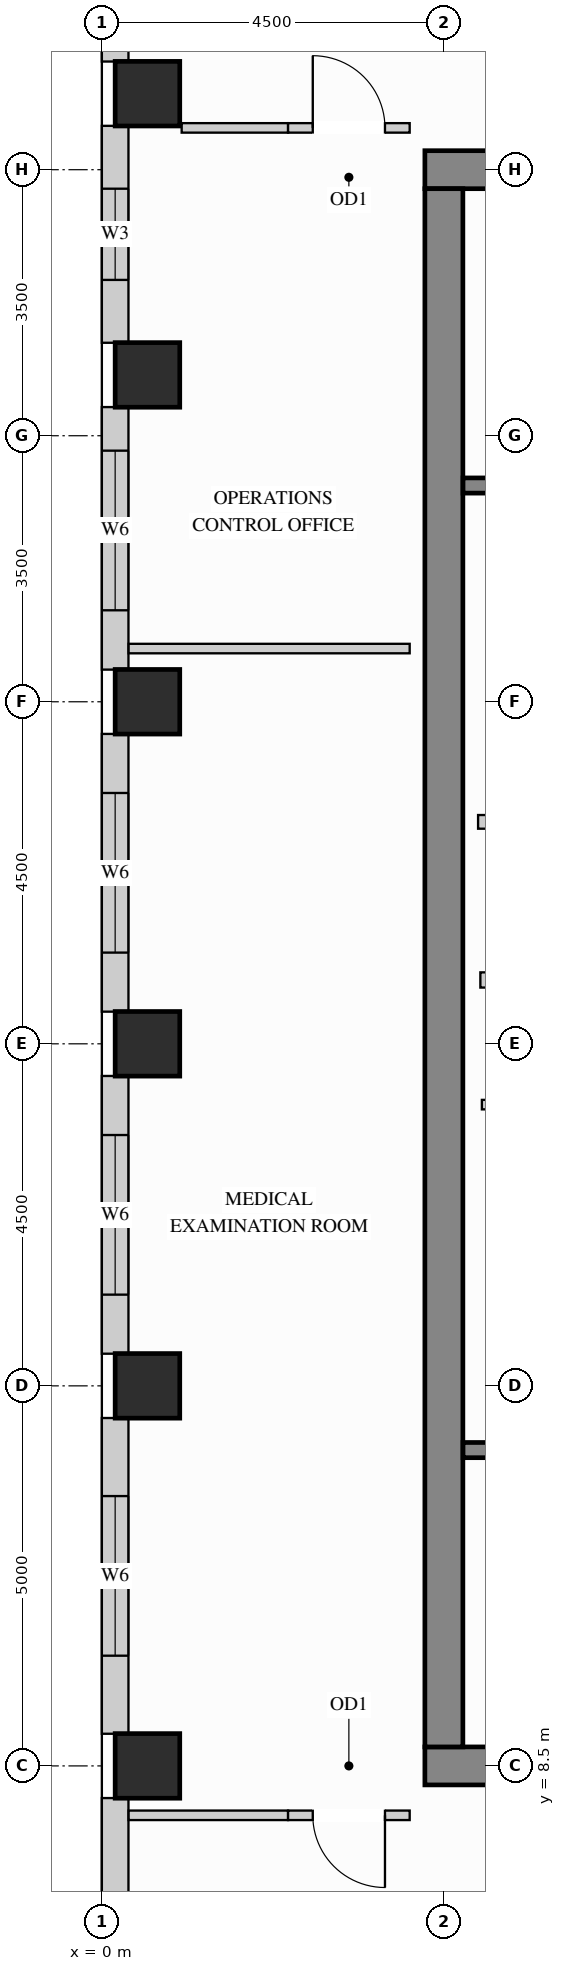
"""IFC4 building model, lengths in metres.
Left out: names, types, materials, properties, quantities, classifications, styles, units other than length and angle.
Written with IfcOpenShell. Run it as: python <this file> out.ifc"""

import sys

from ifc_helpers import new_model, si_unit, direction, frame, frame_2d, origin, origin_2d, place, context, subcontext, project, spatial, rectangle, extrude, source, transform, mapped, element, fill, save


model = new_model("IFC4")
c1 = context("Model", 3, precision=1e-05, world=origin(), true_north=direction((0.0, 1.0)))
c2 = subcontext(c1, "Body", "Model", "MODEL_VIEW")
j1 = project(units=[si_unit("LENGTHUNIT", "METRE"), si_unit("PLANEANGLEUNIT", "RADIAN")], contexts=[c1])
p1 = place(None, origin())
s1 = spatial("IfcSite", under=j1, at=p1, CompositionType="ELEMENT")
p2 = place(p1, origin())
s2 = spatial("IfcBuilding", under=s1, at=p2, CompositionType="ELEMENT")
p3 = place(p2, frame((0.0, 0.0, 248.4)))
s3 = spatial("IfcBuildingStorey", under=s2, at=p3, CompositionType="ELEMENT", Elevation=248.4)
m1 = source(origin(), c2, "Body", "SweptSolid", [
    extrude(rectangle(XDim=0.85, YDim=0.85, at=origin_2d()), origin(), (0.0, 0.0, 1.0), 3.4),
])
for number, where, z_axis, x_axis in (
    (1, (0.6, 13.5, 0.0), (0.0, 0.0, 1.0), (1.0, 0.0, 0.0)),
    (2, (0.6, 18.0, 0.0), (0.0, 0.0, 1.0), (1.0, 0.0, 0.0)),
    (3, (0.6, 22.5, 0.0), (0.0, 0.0, 1.0), (1.0, 0.0, 0.0)),
    (4, (0.6, 26.8, 0.0), (0.0, 0.0, 1.0), (1.0, 0.0, 0.0)),
    (5, (0.6, 30.5, 0.0), (0.0, 0.0, 1.0), (1.0, 0.0, 0.0)),
    (6, (0.6, 8.5, 0.0), (0.0, 0.0, 1.0), (1.0, 0.0, 0.0)),
):
    element("IfcColumn", number, at=place(p3, frame(where, z_axis=z_axis, x_axis=x_axis)), inside=s3, PredefinedType="COLUMN", context=c2, shape_type="MappedRepresentation", body=[
        mapped(m1, transform((0.0, 0.0, 0.0), x_axis=(1.0, 0.0, 0.0), y_axis=(0.0, 1.0, 0.0), z_axis=(0.0, 0.0, 1.0))),
    ])
m2 = source(origin(), c2, "Body", "SweptSolid", [
    extrude(rectangle(XDim=10.5, YDim=0.5, at=frame_2d((5.25, 0.0))), origin(), (0.0, 0.0, 1.0), 3.4),
])
for number, where, z_axis, x_axis in (
    (7, (4.25, 29.5, 0.0), (0.0, 0.0, 1.0), (1.0, 0.0, 0.0)),
    (8, (4.25, 8.5, 0.0), (0.0, 0.0, 1.0), (1.0, 0.0, 0.0)),
):
    element("IfcWall", number, at=place(p3, frame(where, z_axis=z_axis, x_axis=x_axis)), inside=s3, PredefinedType="SHEAR", context=c2, shape_type="MappedRepresentation", body=[
        mapped(m2, transform((0.0, 0.0, 0.0), x_axis=(1.0, 0.0, 0.0), y_axis=(0.0, 1.0, 0.0), z_axis=(0.0, 0.0, 1.0))),
    ])
m3 = source(origin(), c2, "Body", "SweptSolid", [
    extrude(rectangle(XDim=20.5, YDim=0.5, at=frame_2d((10.25, 0.0))), origin(), (0.0, 0.0, 1.0), 3.4),
])
p4 = place(p3, frame((4.5, 8.75, 0.0), z_axis=(0.0, 0.0, 1.0), x_axis=(0.0, 1.0, 0.0)))
e9 = element("IfcWall", 9, at=p4, inside=s3, PredefinedType="SHEAR", context=c2, shape_type="MappedRepresentation", body=[
    mapped(m3, transform((0.0, 0.0, 0.0), x_axis=(1.0, 0.0, 0.0), y_axis=(0.0, 1.0, 0.0), z_axis=(0.0, 0.0, 1.0))),
])
m4 = source(origin(), c2, "Body", "SweptSolid", [
    extrude(rectangle(XDim=0.527, YDim=0.35, at=frame_2d((0.263, 0.0))), origin(), (0.0, 0.0, 1.0), 3.385),
])
p5 = place(p3, frame((0.175, 31.45, 0.0), z_axis=(0.0, 0.0, 1.0), x_axis=(0.0, -1.0, 0.0)))
e10 = element("IfcWall", 10, at=p5, inside=s3, PredefinedType="SOLIDWALL", context=c2, shape_type="MappedRepresentation", body=[
    mapped(m4, transform((0.0, 0.0, 0.0), x_axis=(1.0, 0.0, 0.0), y_axis=(0.0, 1.0, 0.0), z_axis=(0.0, 0.0, 1.0))),
])
p6 = place(p3, frame((0.175, 30.077, 0.0), z_axis=(0.0, 0.0, 1.0), x_axis=(0.0, -1.0, 0.0)))
e11 = element("IfcWall", 11, at=p6, inside=s3, PredefinedType="SOLIDWALL", context=c2, shape_type="SweptSolid", body=[
    extrude(rectangle(XDim=2.854, YDim=0.35, at=frame_2d((1.427, 0.0))), origin(), (0.0, 0.0, 1.0), 3.385),
])
p7 = place(p6, frame((0.827, 0.0, 0.78)))
e12 = element("IfcOpeningElement", 12, at=p7, cuts=e11, PredefinedType="OPENING", context=c2, shape_type="SweptSolid", body=[
    extrude(rectangle(XDim=1.2, YDim=2.25, at=frame_2d((0.6, 1.125))), frame((0.0, 0.185, 0.0), z_axis=(0.0, -1.0, 0.0), x_axis=(1.0, 0.0, 0.0)), (0.0, 0.0, 1.0), 0.37),
])
p8 = place(p3, frame((0.175, 26.377, 0.0), z_axis=(0.0, 0.0, 1.0), x_axis=(0.0, -1.0, 0.0)))
e13 = element("IfcWall", 13, at=p8, inside=s3, PredefinedType="SOLIDWALL", context=c2, shape_type="SweptSolid", body=[
    extrude(rectangle(XDim=3.454, YDim=0.35, at=frame_2d((1.727, 0.0))), origin(), (0.0, 0.0, 1.0), 3.385),
])
p9 = place(p8, frame((0.573, 0.0, 0.78)))
e14 = element("IfcOpeningElement", 14, at=p9, cuts=e13, PredefinedType="OPENING", context=c2, shape_type="SweptSolid", body=[
    extrude(rectangle(XDim=2.1, YDim=2.25, at=frame_2d((1.05, 1.125))), frame((0.0, 0.185, 0.0), z_axis=(0.0, -1.0, 0.0), x_axis=(1.0, 0.0, 0.0)), (0.0, 0.0, 1.0), 0.37),
])
p10 = place(p3, frame((0.175, 22.077, 0.0), z_axis=(0.0, 0.0, 1.0), x_axis=(0.0, -1.0, 0.0)))
e15 = element("IfcWall", 15, at=p10, inside=s3, PredefinedType="SOLIDWALL", context=c2, shape_type="SweptSolid", body=[
    extrude(rectangle(XDim=3.654, YDim=0.35, at=frame_2d((1.827, 0.0))), origin(), (0.0, 0.0, 1.0), 3.385),
])
p11 = place(p10, frame((0.777, 0.0, 0.78)))
e16 = element("IfcOpeningElement", 16, at=p11, cuts=e15, PredefinedType="OPENING", context=c2, shape_type="SweptSolid", body=[
    extrude(rectangle(XDim=2.1, YDim=2.25, at=frame_2d((1.05, 1.125))), frame((0.0, 0.185, 0.0), z_axis=(0.0, -1.0, 0.0), x_axis=(1.0, 0.0, 0.0)), (0.0, 0.0, 1.0), 0.37),
])
p12 = place(p3, frame((0.175, 17.577, 0.0), z_axis=(0.0, 0.0, 1.0), x_axis=(0.0, -1.0, 0.0)))
e17 = element("IfcWall", 17, at=p12, inside=s3, PredefinedType="SOLIDWALL", context=c2, shape_type="SweptSolid", body=[
    extrude(rectangle(XDim=3.654, YDim=0.35, at=frame_2d((1.827, 0.0))), origin(), (0.0, 0.0, 1.0), 3.385),
])
p13 = place(p12, frame((0.777, 0.0, 0.78)))
e18 = element("IfcOpeningElement", 18, at=p13, cuts=e17, PredefinedType="OPENING", context=c2, shape_type="SweptSolid", body=[
    extrude(rectangle(XDim=2.1, YDim=2.25, at=frame_2d((1.05, 1.125))), frame((0.0, 0.185, 0.0), z_axis=(0.0, -1.0, 0.0), x_axis=(1.0, 0.0, 0.0)), (0.0, 0.0, 1.0), 0.37),
])
p14 = place(p3, frame((0.175, 13.077, 0.0), z_axis=(0.0, 0.0, 1.0), x_axis=(0.0, -1.0, 0.0)))
e19 = element("IfcWall", 19, at=p14, inside=s3, PredefinedType="SOLIDWALL", context=c2, shape_type="SweptSolid", body=[
    extrude(rectangle(XDim=4.154, YDim=0.35, at=frame_2d((2.077, 0.0))), origin(), (0.0, 0.0, 1.0), 3.385),
])
p15 = place(p14, frame((1.027, 0.0, 0.78)))
e20 = element("IfcOpeningElement", 20, at=p15, cuts=e19, PredefinedType="OPENING", context=c2, shape_type="SweptSolid", body=[
    extrude(rectangle(XDim=2.1, YDim=2.25, at=frame_2d((1.05, 1.125))), frame((0.0, 0.185, 0.0), z_axis=(0.0, -1.0, 0.0), x_axis=(1.0, 0.0, 0.0)), (0.0, 0.0, 1.0), 0.37),
])
p16 = place(p3, frame((0.175, 8.077, 0.0), z_axis=(0.0, 0.0, 1.0), x_axis=(0.0, -1.0, 0.0)))
e21 = element("IfcWall", 21, at=p16, inside=s3, PredefinedType="SOLIDWALL", context=c2, shape_type="SweptSolid", body=[
    extrude(rectangle(XDim=4.154, YDim=0.35, at=frame_2d((2.077, 0.0))), origin(), (0.0, 0.0, 1.0), 3.385),
])
p17 = place(p16, frame((2.355, 0.0, 0.78)))
e22 = element("IfcOpeningElement", 22, at=p17, cuts=e21, PredefinedType="OPENING", context=c2, shape_type="SweptSolid", body=[
    extrude(rectangle(XDim=1.2, YDim=2.25, at=frame_2d((0.6, 1.125))), frame((0.0, 0.185, 0.0), z_axis=(0.0, -1.0, 0.0), x_axis=(1.0, 0.0, 0.0)), (0.0, 0.0, 1.0), 0.37),
])
m5 = source(origin(), c2, "Body", "SweptSolid", [
    extrude(rectangle(XDim=2.2, YDim=0.18, at=frame_2d((1.1, 0.0))), origin(), (0.0, 0.0, 1.0), 3.385),
])
p18 = place(p3, frame((4.95, 20.92, 0.0), z_axis=(0.0, 0.0, 1.0), x_axis=(1.0, 0.0, 0.0)))
e23 = element("IfcWall", 23, at=p18, inside=s3, PredefinedType="PARTITIONING", context=c2, shape_type="MappedRepresentation", body=[
    mapped(m5, transform((0.0, 0.0, 0.0), x_axis=(1.0, 0.0, 0.0), y_axis=(0.0, 1.0, 0.0), z_axis=(0.0, 0.0, 1.0))),
])
p19 = place(p3, frame((5.0, 17.2, 0.0), z_axis=(0.0, 0.0, 1.0), x_axis=(1.0, 0.0, 0.0)))
e24 = element("IfcWall", 24, at=p19, inside=s3, PredefinedType="PARTITIONING", context=c2, shape_type="SweptSolid", body=[
    extrude(rectangle(XDim=2.4, YDim=0.125, at=frame_2d((1.2, 0.0))), origin(), (0.0, 0.0, 1.0), 3.385),
])
p20 = place(p19, frame((0.7, 0.0, 0.0)))
e25 = element("IfcOpeningElement", 25, at=p20, cuts=e24, PredefinedType="OPENING", context=c2, shape_type="SweptSolid", body=[
    extrude(rectangle(XDim=0.85, YDim=2.1, at=frame_2d((0.425, 1.05))), frame((0.0, 0.073, 0.0), z_axis=(0.0, -1.0, 0.0), x_axis=(1.0, 0.0, 0.0)), (0.0, 0.0, 1.0), 0.145),
])
m6 = source(origin(), c2, "Body", "SweptSolid", [
    extrude(rectangle(XDim=1.4, YDim=0.125, at=frame_2d((0.7, 0.0))), origin(), (0.0, 0.0, 1.0), 3.385),
])
p21 = place(p3, frame((1.05, 30.05, 0.0), z_axis=(0.0, 0.0, 1.0), x_axis=(1.0, 0.0, 0.0)))
e26 = element("IfcWall", 26, at=p21, inside=s3, PredefinedType="PARTITIONING", context=c2, shape_type="MappedRepresentation", body=[
    mapped(m6, transform((0.0, 0.0, 0.0), x_axis=(1.0, 0.0, 0.0), y_axis=(0.0, 1.0, 0.0), z_axis=(0.0, 0.0, 1.0))),
])
p22 = place(p3, frame((2.45, 30.05, 0.0), z_axis=(0.0, 0.0, 1.0), x_axis=(1.0, 0.0, 0.0)))
e27 = element("IfcWall", 27, at=p22, inside=s3, PredefinedType="PARTITIONING", context=c2, shape_type="SweptSolid", body=[
    extrude(rectangle(XDim=1.6, YDim=0.125, at=frame_2d((0.8, 0.0))), origin(), (0.0, 0.0, 1.0), 3.385),
])
p23 = place(p22, frame((0.325, 0.0, 0.0)))
e28 = element("IfcOpeningElement", 28, at=p23, cuts=e27, PredefinedType="OPENING", context=c2, shape_type="SweptSolid", body=[
    extrude(rectangle(XDim=0.95, YDim=2.15, at=frame_2d((0.475, 1.075))), frame((0.0, 0.073, 0.0), z_axis=(0.0, -1.0, 0.0), x_axis=(1.0, 0.0, 0.0)), (0.0, 0.0, 1.0), 0.145),
])
m7 = source(origin(), c2, "Body", "SweptSolid", [
    extrude(rectangle(XDim=2.098, YDim=0.125, at=frame_2d((1.049, 0.0))), origin(), (0.0, 0.0, 1.0), 3.385),
])
p24 = place(p3, frame((0.352, 7.85, 0.0), z_axis=(0.0, 0.0, 1.0), x_axis=(1.0, 0.0, 0.0)))
e29 = element("IfcWall", 29, at=p24, inside=s3, PredefinedType="PARTITIONING", context=c2, shape_type="MappedRepresentation", body=[
    mapped(m7, transform((0.0, 0.0, 0.0), x_axis=(1.0, 0.0, 0.0), y_axis=(0.0, 1.0, 0.0), z_axis=(0.0, 0.0, 1.0))),
])
p25 = place(p3, frame((2.45, 7.85, 0.0), z_axis=(0.0, 0.0, 1.0), x_axis=(1.0, 0.0, 0.0)))
e30 = element("IfcWall", 30, at=p25, inside=s3, PredefinedType="PARTITIONING", context=c2, shape_type="SweptSolid", body=[
    extrude(rectangle(XDim=1.6, YDim=0.125, at=frame_2d((0.8, 0.0))), origin(), (0.0, 0.0, 1.0), 3.385),
])
p26 = place(p25, frame((0.325, 0.0, 0.0)))
e31 = element("IfcOpeningElement", 31, at=p26, cuts=e30, PredefinedType="OPENING", context=c2, shape_type="SweptSolid", body=[
    extrude(rectangle(XDim=0.95, YDim=2.15, at=frame_2d((0.475, 1.075))), frame((0.0, 0.073, 0.0), z_axis=(0.0, -1.0, 0.0), x_axis=(1.0, 0.0, 0.0)), (0.0, 0.0, 1.0), 0.145),
])
m8 = source(origin(), c2, "Body", "SweptSolid", [
    extrude(rectangle(XDim=3.698, YDim=0.125, at=frame_2d((1.849, 0.0))), origin(), (0.0, 0.0, 1.0), 3.385),
])
p27 = place(p3, frame((0.352, 23.2, 0.0), z_axis=(0.0, 0.0, 1.0), x_axis=(1.0, 0.0, 0.0)))
e32 = element("IfcWall", 32, at=p27, inside=s3, PredefinedType="PARTITIONING", context=c2, shape_type="MappedRepresentation", body=[
    mapped(m8, transform((0.0, 0.0, 0.0), x_axis=(1.0, 0.0, 0.0), y_axis=(0.0, 1.0, 0.0), z_axis=(0.0, 0.0, 1.0))),
])
m9 = source(origin(), c2, "Body", "SweptSolid", [
    extrude(rectangle(XDim=2.09, YDim=0.2, at=frame_2d((1.045, 0.0))), origin(), (0.0, 0.0, 1.0), 3.385),
])
p28 = place(p3, frame((4.98, 18.84, 0.0), z_axis=(0.0, 0.0, 1.0), x_axis=(1.0, 0.0, 0.0)))
e33 = element("IfcWall", 33, at=p28, inside=s3, PredefinedType="PARTITIONING", context=c2, shape_type="MappedRepresentation", body=[
    mapped(m9, transform((0.0, 0.0, 0.0), x_axis=(1.0, 0.0, 0.0), y_axis=(0.0, 1.0, 0.0), z_axis=(0.0, 0.0, 1.0))),
])
p29 = place(p3, frame((4.752, 12.655, 0.0), z_axis=(0.0, 0.0, 1.0), x_axis=(1.0, 0.0, 0.0)))
e34 = element("IfcWall", 34, at=p29, inside=s3, PredefinedType="SHEAR", context=c2, shape_type="SweptSolid", body=[
    extrude(rectangle(XDim=7.653, YDim=0.2, at=frame_2d((3.827, 0.0))), origin(), (0.0, 0.0, 1.0), 3.4),
])
p30 = place(p29, frame((0.4, 0.0, 0.0)))
e35 = element("IfcOpeningElement", 35, at=p30, cuts=e34, PredefinedType="OPENING", context=c2, shape_type="SweptSolid", body=[
    extrude(rectangle(XDim=1.1, YDim=2.15, at=frame_2d((0.55, 1.075))), frame((0.0, 0.11, 0.0), z_axis=(0.0, -1.0, 0.0), x_axis=(1.0, 0.0, 0.0)), (0.0, 0.0, 1.0), 0.22),
])
p31 = place(p3, frame((4.752, 25.345, 0.0), z_axis=(0.0, 0.0, 1.0), x_axis=(1.0, 0.0, 0.0)))
e36 = element("IfcWall", 36, at=p31, inside=s3, PredefinedType="SHEAR", context=c2, shape_type="SweptSolid", body=[
    extrude(rectangle(XDim=7.653, YDim=0.2, at=frame_2d((3.827, 0.0))), origin(), (0.0, 0.0, 1.0), 3.4),
])
p32 = place(p31, frame((0.4, 0.0, 0.0)))
e37 = element("IfcOpeningElement", 37, at=p32, cuts=e36, PredefinedType="OPENING", context=c2, shape_type="SweptSolid", body=[
    extrude(rectangle(XDim=1.1, YDim=2.15, at=frame_2d((0.55, 1.075))), frame((0.0, 0.11, 0.0), z_axis=(0.0, -1.0, 0.0), x_axis=(1.0, 0.0, 0.0)), (0.0, 0.0, 1.0), 0.22),
])
m10 = source(origin(), c2, "Body", "SweptSolid", [
    extrude(rectangle(XDim=0.95, YDim=2.15, at=frame_2d((0.475, 1.075))), frame((0.0, 0.025, 0.0), z_axis=(0.0, -1.0, 0.0), x_axis=(1.0, 0.0, 0.0)), (0.0, 0.0, 1.0), 0.05),
])
p33 = place(p26, origin())
e38 = element("IfcDoor", 38, at=p33, inside=s3, OperationType="SINGLE_SWING_RIGHT", PredefinedType="DOOR", context=c2, shape_type="MappedRepresentation", body=[
    mapped(m10, transform((0.0, 0.0, 0.0), x_axis=(1.0, 0.0, 0.0), y_axis=(0.0, 1.0, 0.0), z_axis=(0.0, 0.0, 1.0))),
])
fill(e31, e38)
p34 = place(p23, origin())
e39 = element("IfcDoor", 39, at=p34, inside=s3, OperationType="SINGLE_SWING_LEFT", PredefinedType="DOOR", context=c2, shape_type="MappedRepresentation", body=[
    mapped(m10, transform((0.0, 0.0, 0.0), x_axis=(1.0, 0.0, 0.0), y_axis=(0.0, 1.0, 0.0), z_axis=(0.0, 0.0, 1.0))),
])
fill(e28, e39)
m11 = source(origin(), c2, "Body", "SweptSolid", [
    extrude(rectangle(XDim=1.2, YDim=2.25, at=frame_2d((0.6, 1.125))), frame((0.0, 0.03, 0.0), z_axis=(0.0, -1.0, 0.0), x_axis=(1.0, 0.0, 0.0)), (0.0, 0.0, 1.0), 0.06),
])
p35 = place(p7, origin())
e40 = element("IfcWindow", 40, at=p35, inside=s3, PartitioningType="SINGLE_PANEL", PredefinedType="WINDOW", context=c2, shape_type="MappedRepresentation", body=[
    mapped(m11, transform((0.0, 0.0, 0.0), x_axis=(1.0, 0.0, 0.0), y_axis=(0.0, 1.0, 0.0), z_axis=(0.0, 0.0, 1.0))),
])
fill(e12, e40)
m12 = source(origin(), c2, "Body", "SweptSolid", [
    extrude(rectangle(XDim=2.1, YDim=2.25, at=frame_2d((1.05, 1.125))), frame((0.0, 0.03, 0.0), z_axis=(0.0, -1.0, 0.0), x_axis=(1.0, 0.0, 0.0)), (0.0, 0.0, 1.0), 0.06),
])
p36 = place(p9, origin())
e41 = element("IfcWindow", 41, at=p36, inside=s3, PartitioningType="SINGLE_PANEL", PredefinedType="WINDOW", context=c2, shape_type="MappedRepresentation", body=[
    mapped(m12, transform((0.0, 0.0, 0.0), x_axis=(1.0, 0.0, 0.0), y_axis=(0.0, 1.0, 0.0), z_axis=(0.0, 0.0, 1.0))),
])
fill(e14, e41)
p37 = place(p11, origin())
e42 = element("IfcWindow", 42, at=p37, inside=s3, PartitioningType="SINGLE_PANEL", PredefinedType="WINDOW", context=c2, shape_type="MappedRepresentation", body=[
    mapped(m12, transform((0.0, 0.0, 0.0), x_axis=(1.0, 0.0, 0.0), y_axis=(0.0, 1.0, 0.0), z_axis=(0.0, 0.0, 1.0))),
])
fill(e16, e42)
p38 = place(p13, origin())
e43 = element("IfcWindow", 43, at=p38, inside=s3, PartitioningType="SINGLE_PANEL", PredefinedType="WINDOW", context=c2, shape_type="MappedRepresentation", body=[
    mapped(m12, transform((0.0, 0.0, 0.0), x_axis=(1.0, 0.0, 0.0), y_axis=(0.0, 1.0, 0.0), z_axis=(0.0, 0.0, 1.0))),
])
fill(e18, e43)
p39 = place(p15, origin())
e44 = element("IfcWindow", 44, at=p39, inside=s3, PartitioningType="SINGLE_PANEL", PredefinedType="WINDOW", context=c2, shape_type="MappedRepresentation", body=[
    mapped(m12, transform((0.0, 0.0, 0.0), x_axis=(1.0, 0.0, 0.0), y_axis=(0.0, 1.0, 0.0), z_axis=(0.0, 0.0, 1.0))),
])
fill(e20, e44)
save(model, sys.argv[1])
